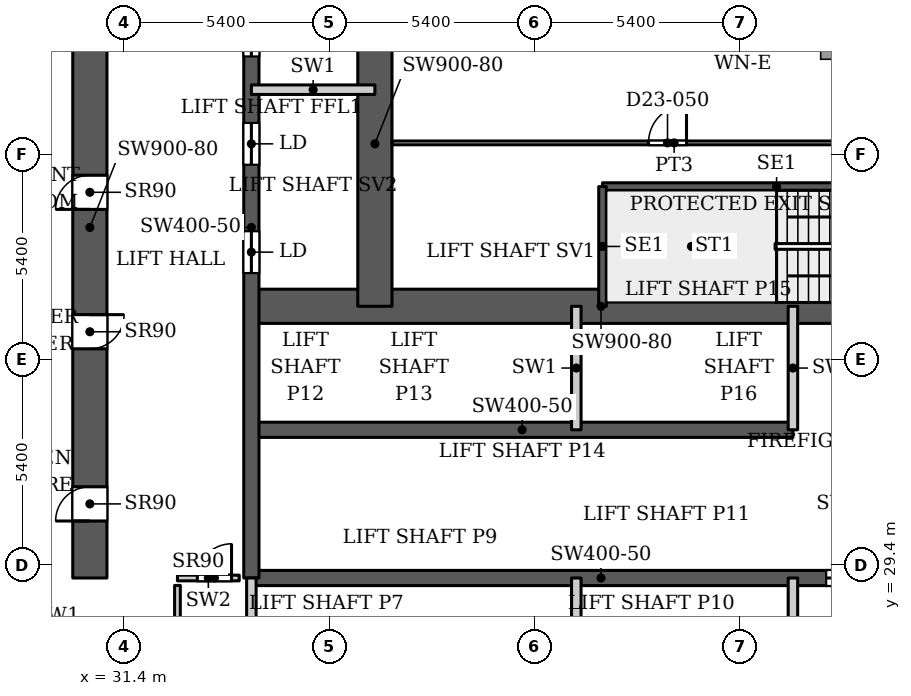
"""IFC4 building model, lengths in metres.
Left out: names, types, materials, properties, quantities, classifications, styles, units other than length and angle.
Written with IfcOpenShell. Run it as: python <this file> out.ifc"""

import sys

from ifc_helpers import new_model, si_unit, direction, frame, frame_2d, origin, place, context, subcontext, project, spatial, rectangle, extrude, source, transform, mapped, element, fill, save


model = new_model("IFC4")
c1 = context("Model", 3, precision=1e-05, world=origin(), true_north=direction((0.0, 1.0)))
c2 = subcontext(c1, "Body", "Model", "MODEL_VIEW")
j1 = project(units=[si_unit("LENGTHUNIT", "METRE"), si_unit("PLANEANGLEUNIT", "RADIAN")], contexts=[c1])
p1 = place(None, origin())
s1 = spatial("IfcSite", under=j1, at=p1, CompositionType="ELEMENT")
p2 = place(p1, origin())
s2 = spatial("IfcBuilding", under=s1, at=p2, CompositionType="ELEMENT")
p3 = place(p2, frame((0.0, 0.0, 101.9)))
s3 = spatial("IfcBuildingStorey", under=s2, at=p3, CompositionType="ELEMENT", Elevation=101.9)
p4 = place(p3, frame((34.75, 29.05, 0.0), z_axis=(0.0, 0.0, 1.0), x_axis=(1.0, 0.0, 0.0)))
e1 = element("IfcWall", 1, at=p4, inside=s3, PredefinedType="SHEAR", context=c2, shape_type="SweptSolid", body=[
    extrude(rectangle(XDim=18.4, YDim=0.4, at=frame_2d((9.2, 0.0))), origin(), (0.0, 0.0, 1.0), 3.9),
])
p5 = place(p4, frame((15.125, 0.0, 0.0)))
e2 = element("IfcOpeningElement", 2, at=p5, cuts=e1, PredefinedType="OPENING", context=c2, shape_type="SweptSolid", body=[
    extrude(rectangle(XDim=1.1, YDim=2.2, at=frame_2d((0.55, 1.1))), frame((0.0, 0.21, 0.0), z_axis=(0.0, -1.0, 0.0), x_axis=(1.0, 0.0, 0.0)), (0.0, 0.0, 1.0), 0.42),
])
p6 = place(p3, frame((34.75, 32.95, 0.0), z_axis=(0.0, 0.0, 1.0), x_axis=(1.0, 0.0, 0.0)))
e3 = element("IfcWall", 3, at=p6, inside=s3, PredefinedType="SHEAR", context=c2, shape_type="SweptSolid", body=[
    extrude(rectangle(XDim=14.25, YDim=0.4, at=frame_2d((7.125, 0.0))), origin(), (0.0, 0.0, 1.0), 3.9),
])
p7 = place(p3, frame((34.75, 36.2, 0.0), z_axis=(0.0, 0.0, 1.0), x_axis=(1.0, 0.0, 0.0)))
e4 = element("IfcWall", 4, at=p7, inside=s3, PredefinedType="SHEAR", context=c2, shape_type="SweptSolid", body=[
    extrude(rectangle(XDim=18.4, YDim=0.9, at=frame_2d((9.2, 0.0))), origin(), (0.0, 0.0, 1.0), 3.9),
])
p8 = place(p7, frame((16.9, 0.0, 0.0)))
e5 = element("IfcOpeningElement", 5, at=p8, cuts=e4, PredefinedType="OPENING", context=c2, shape_type="SweptSolid", body=[
    extrude(rectangle(XDim=1.0, YDim=2.2, at=frame_2d((0.5, 1.1))), frame((0.0, 0.46, 0.0), z_axis=(0.0, -1.0, 0.0), x_axis=(1.0, 0.0, 0.0)), (0.0, 0.0, 1.0), 0.92),
])
p9 = place(p3, frame((34.75, 29.05, 0.0), z_axis=(0.0, 0.0, 1.0), x_axis=(0.0, 1.0, 0.0)))
e6 = element("IfcWall", 6, at=p9, inside=s3, PredefinedType="SHEAR", context=c2, shape_type="SweptSolid", body=[
    extrude(rectangle(XDim=18.45, YDim=0.4, at=frame_2d((9.225, 0.0))), origin(), (0.0, 0.0, 1.0), 3.9),
])
p10 = place(p9, frame((8.025, 0.0, 0.0)))
e7 = element("IfcOpeningElement", 7, at=p10, cuts=e6, PredefinedType="OPENING", context=c2, shape_type="SweptSolid", body=[
    extrude(rectangle(XDim=1.1, YDim=2.2, at=frame_2d((0.55, 1.1))), frame((0.0, 0.21, 0.0), z_axis=(0.0, -1.0, 0.0), x_axis=(1.0, 0.0, 0.0)), (0.0, 0.0, 1.0), 0.42),
])
p11 = place(p9, frame((10.875, 0.0, 0.0)))
e8 = element("IfcOpeningElement", 8, at=p11, cuts=e6, PredefinedType="OPENING", context=c2, shape_type="SweptSolid", body=[
    extrude(rectangle(XDim=1.1, YDim=2.2, at=frame_2d((0.55, 1.1))), frame((0.0, 0.21, 0.0), z_axis=(0.0, -1.0, 0.0), x_axis=(1.0, 0.0, 0.0)), (0.0, 0.0, 1.0), 0.42),
])
p12 = place(p9, frame((13.725, 0.0, 0.0)))
e9 = element("IfcOpeningElement", 9, at=p12, cuts=e6, PredefinedType="OPENING", context=c2, shape_type="SweptSolid", body=[
    extrude(rectangle(XDim=1.1, YDim=2.2, at=frame_2d((0.55, 1.1))), frame((0.0, 0.21, 0.0), z_axis=(0.0, -1.0, 0.0), x_axis=(1.0, 0.0, 0.0)), (0.0, 0.0, 1.0), 0.42),
])
p13 = place(p9, frame((15.95, 0.0, 0.0)))
e10 = element("IfcOpeningElement", 10, at=p13, cuts=e6, PredefinedType="OPENING", context=c2, shape_type="SweptSolid", body=[
    extrude(rectangle(XDim=1.1, YDim=2.2, at=frame_2d((0.55, 1.1))), frame((0.0, 0.21, 0.0), z_axis=(0.0, -1.0, 0.0), x_axis=(1.0, 0.0, 0.0)), (0.0, 0.0, 1.0), 0.42),
])
p14 = place(p3, frame((38.0, 36.2, 0.0), z_axis=(0.0, 0.0, 1.0), x_axis=(0.0, 1.0, 0.0)))
e11 = element("IfcWall", 11, at=p14, inside=s3, PredefinedType="SHEAR", context=c2, shape_type="SweptSolid", body=[
    extrude(rectangle(XDim=8.55, YDim=0.9, at=frame_2d((4.275, 0.0))), origin(), (0.0, 0.0, 1.0), 3.9),
])
p15 = place(p3, frame((30.5, 29.05, 0.0), z_axis=(0.0, 0.0, 1.0), x_axis=(0.0, 1.0, 0.0)))
e12 = element("IfcWall", 12, at=p15, inside=s3, PredefinedType="SHEAR", context=c2, shape_type="SweptSolid", body=[
    extrude(rectangle(XDim=18.45, YDim=0.9, at=frame_2d((9.225, 0.0))), origin(), (0.0, 0.0, 1.0), 3.9),
])
p16 = place(p15, frame((1.5, 0.0, 0.0)))
e13 = element("IfcOpeningElement", 13, at=p16, cuts=e12, PredefinedType="OPENING", context=c2, shape_type="SweptSolid", body=[
    extrude(rectangle(XDim=0.9, YDim=2.2, at=frame_2d((0.45, 1.1))), frame((0.0, 0.46, 0.0), z_axis=(0.0, -1.0, 0.0), x_axis=(1.0, 0.0, 0.0)), (0.0, 0.0, 1.0), 0.92),
])
p17 = place(p15, frame((6.03, 0.0, 0.0)))
e14 = element("IfcOpeningElement", 14, at=p17, cuts=e12, PredefinedType="OPENING", context=c2, shape_type="SweptSolid", body=[
    extrude(rectangle(XDim=0.9, YDim=2.2, at=frame_2d((0.45, 1.1))), frame((0.0, 0.46, 0.0), z_axis=(0.0, -1.0, 0.0), x_axis=(1.0, 0.0, 0.0)), (0.0, 0.0, 1.0), 0.92),
])
p18 = place(p15, frame((9.7, 0.0, 0.0)))
e15 = element("IfcOpeningElement", 15, at=p18, cuts=e12, PredefinedType="OPENING", context=c2, shape_type="SweptSolid", body=[
    extrude(rectangle(XDim=0.9, YDim=2.2, at=frame_2d((0.45, 1.1))), frame((0.0, 0.46, 0.0), z_axis=(0.0, -1.0, 0.0), x_axis=(1.0, 0.0, 0.0)), (0.0, 0.0, 1.0), 0.92),
])
p19 = place(p3, frame((29.712, 26.072, 0.0), z_axis=(0.0, 0.0, 1.0), x_axis=(-0.511028049012, 0.859564036662, 0.0)))
e16 = element("IfcWall", 16, at=p19, inside=s3, PredefinedType="SOLIDWALL", context=c2, shape_type="SweptSolid", body=[
    extrude(rectangle(XDim=4.634, YDim=0.25, at=frame_2d((2.317, 0.0))), origin(), (0.0, 0.0, 1.0), 3.147),
])
p20 = place(p3, frame((27.195, 31.969, 0.0), z_axis=(0.0, 0.0, 1.0), x_axis=(0.052559748861, 0.998617781135, 0.0)))
e17 = element("IfcWall", 17, at=p20, inside=s3, PredefinedType="SOLIDWALL", context=c2, shape_type="SweptSolid", body=[
    extrude(rectangle(XDim=55.972, YDim=0.25, at=frame_2d((27.986, 0.0))), origin(), (0.0, 0.0, 1.0), 3.75),
])
p21 = place(p3, frame((43.99, 39.35, 0.0), z_axis=(0.0, 0.0, 1.0), x_axis=(1.0, 0.0, 0.0)))
e18 = element("IfcWall", 18, at=p21, inside=s3, PredefinedType="SHEAR", context=c2, shape_type="SweptSolid", body=[
    extrude(rectangle(XDim=9.16, YDim=0.2, at=frame_2d((4.58, 0.0))), origin(), (0.0, 0.0, 1.0), 3.9),
])
p22 = place(p3, frame((43.99, 36.2, 0.0), z_axis=(0.0, 0.0, 1.0), x_axis=(0.0, 1.0, 0.0)))
e19 = element("IfcWall", 19, at=p22, inside=s3, PredefinedType="SHEAR", context=c2, shape_type="SweptSolid", body=[
    extrude(rectangle(XDim=3.15, YDim=0.2, at=frame_2d((1.575, 0.0))), origin(), (0.0, 0.0, 1.0), 3.9),
])
for number, where, z_axis, x_axis in (
    (20, (34.75, 25.8, 0.0), (0.0, 0.0, 1.0), (0.0, 1.0, 0.0)),
    (21, (43.3, 25.8, 0.0), (0.0, 0.0, 1.0), (0.0, 1.0, 0.0)),
    (22, (43.3, 32.95, 0.0), (0.0, 0.0, 1.0), (0.0, 1.0, 0.0)),
    (23, (49.0, 25.8, 0.0), (0.0, 0.0, 1.0), (0.0, 1.0, 0.0)),
    (24, (49.0, 32.95, 0.0), (0.0, 0.0, 1.0), (0.0, 1.0, 0.0)),
    (25, (34.75, 41.9, 0.0), (0.0, 0.0, 1.0), (1.0, 0.0, 0.0)),
):
    element("IfcWall", number, at=place(p3, frame(where, z_axis=z_axis, x_axis=x_axis)), inside=s3, PredefinedType="PARTITIONING", context=c2, shape_type="SweptSolid", body=[
        extrude(rectangle(XDim=3.25, YDim=0.25, at=frame_2d((1.625, 0.0))), origin(), (0.0, 0.0, 1.0), 3.9),
    ])
p23 = place(p3, frame((32.805, 29.05, 0.0), z_axis=(0.0, 0.0, 1.0), x_axis=(1.0, 0.0, 0.0)))
e26 = element("IfcWall", 26, at=p23, inside=s3, PredefinedType="PARTITIONING", context=c2, shape_type="SweptSolid", body=[
    extrude(rectangle(XDim=1.625, YDim=0.15, at=frame_2d((0.812, 0.0))), origin(), (0.0, 0.0, 1.0), 3.9),
])
p24 = place(p23, frame((0.523, 0.0, 0.0)))
e27 = element("IfcOpeningElement", 27, at=p24, cuts=e26, PredefinedType="OPENING", context=c2, shape_type="SweptSolid", body=[
    extrude(rectangle(XDim=0.9, YDim=2.2, at=frame_2d((0.45, 1.1))), frame((0.0, 0.085, 0.0), z_axis=(0.0, -1.0, 0.0), x_axis=(1.0, 0.0, 0.0)), (0.0, 0.0, 1.0), 0.17),
])
p25 = place(p3, frame((32.805, 24.98, 0.0), z_axis=(0.0, 0.0, 1.0), x_axis=(0.0, 1.0, 0.0)))
e28 = element("IfcWall", 28, at=p25, inside=s3, PredefinedType="PARTITIONING", context=c2, shape_type="SweptSolid", body=[
    extrude(rectangle(XDim=3.875, YDim=0.15, at=frame_2d((1.938, 0.0))), origin(), (0.0, 0.0, 1.0), 3.9),
])
p26 = place(p3, frame((38.449, 40.5, 0.0), z_axis=(0.0, 0.0, 1.0), x_axis=(1.0, 0.0, 0.0)))
e29 = element("IfcWall", 29, at=p26, inside=s3, PredefinedType="PARTITIONING", context=c2, shape_type="SweptSolid", body=[
    extrude(rectangle(XDim=14.851, YDim=0.1, at=frame_2d((7.426, 0.0))), origin(), (0.0, 0.0, 1.0), 3.6),
])
p27 = place(p26, frame((6.751, 0.0, 0.0)))
e30 = element("IfcOpeningElement", 30, at=p27, cuts=e29, PredefinedType="OPENING", context=c2, shape_type="SweptSolid", body=[
    extrude(rectangle(XDim=1.0, YDim=2.1, at=frame_2d((0.5, 1.05))), frame((0.0, 0.06, 0.0), z_axis=(0.0, -1.0, 0.0), x_axis=(1.0, 0.0, 0.0)), (0.0, 0.0, 1.0), 0.12),
])
m1 = source(origin(), c2, "Body", "SweptSolid", [
    extrude(rectangle(XDim=1.1, YDim=2.2, at=frame_2d((0.55, 1.1))), frame((0.0, 0.025, 0.0), z_axis=(0.0, -1.0, 0.0), x_axis=(1.0, 0.0, 0.0)), (0.0, 0.0, 1.0), 0.05),
])
p28 = place(p10, origin())
e31 = element("IfcDoor", 31, at=p28, inside=s3, OperationType="SLIDING_TO_LEFT", PredefinedType="DOOR", context=c2, shape_type="MappedRepresentation", body=[
    mapped(m1, transform((0.0, 0.0, 0.0), x_axis=(1.0, 0.0, 0.0), y_axis=(0.0, 1.0, 0.0), z_axis=(0.0, 0.0, 1.0), scale=1.0)),
])
fill(e7, e31)
p29 = place(p11, origin())
e32 = element("IfcDoor", 32, at=p29, inside=s3, OperationType="SLIDING_TO_LEFT", PredefinedType="DOOR", context=c2, shape_type="MappedRepresentation", body=[
    mapped(m1, transform((0.0, 0.0, 0.0), x_axis=(1.0, 0.0, 0.0), y_axis=(0.0, 1.0, 0.0), z_axis=(0.0, 0.0, 1.0), scale=1.0)),
])
fill(e8, e32)
p30 = place(p12, origin())
e33 = element("IfcDoor", 33, at=p30, inside=s3, OperationType="SLIDING_TO_LEFT", PredefinedType="DOOR", context=c2, shape_type="MappedRepresentation", body=[
    mapped(m1, transform((0.0, 0.0, 0.0), x_axis=(1.0, 0.0, 0.0), y_axis=(0.0, 1.0, 0.0), z_axis=(0.0, 0.0, 1.0), scale=1.0)),
])
fill(e9, e33)
p31 = place(p5, origin())
e34 = element("IfcDoor", 34, at=p31, inside=s3, OperationType="SLIDING_TO_LEFT", PredefinedType="DOOR", context=c2, shape_type="MappedRepresentation", body=[
    mapped(m1, transform((0.0, 0.0, 0.0), x_axis=(1.0, 0.0, 0.0), y_axis=(0.0, 1.0, 0.0), z_axis=(0.0, 0.0, 1.0), scale=1.0)),
])
fill(e2, e34)
m2 = source(origin(), c2, "Body", "SweptSolid", [
    extrude(rectangle(XDim=0.9, YDim=2.2, at=frame_2d((0.45, 1.1))), frame((0.0, 0.025, 0.0), z_axis=(0.0, -1.0, 0.0), x_axis=(1.0, 0.0, 0.0)), (0.0, 0.0, 1.0), 0.05),
])
p32 = place(p16, origin())
e35 = element("IfcDoor", 35, at=p32, inside=s3, OperationType="SINGLE_SWING_LEFT", PredefinedType="DOOR", context=c2, shape_type="MappedRepresentation", body=[
    mapped(m2, transform((0.0, 0.0, 0.0), x_axis=(1.0, 0.0, 0.0), y_axis=(0.0, 1.0, 0.0), z_axis=(0.0, 0.0, 1.0), scale=1.0)),
])
fill(e13, e35)
p33 = place(p17, origin())
e36 = element("IfcDoor", 36, at=p33, inside=s3, OperationType="SINGLE_SWING_RIGHT", PredefinedType="DOOR", context=c2, shape_type="MappedRepresentation", body=[
    mapped(m2, transform((0.0, 0.0, 0.0), x_axis=(1.0, 0.0, 0.0), y_axis=(0.0, 1.0, 0.0), z_axis=(0.0, 0.0, 1.0), scale=1.0)),
])
fill(e14, e36)
p34 = place(p18, origin())
e37 = element("IfcDoor", 37, at=p34, inside=s3, OperationType="SINGLE_SWING_LEFT", PredefinedType="DOOR", context=c2, shape_type="MappedRepresentation", body=[
    mapped(m2, transform((0.0, 0.0, 0.0), x_axis=(1.0, 0.0, 0.0), y_axis=(0.0, 1.0, 0.0), z_axis=(0.0, 0.0, 1.0), scale=1.0)),
])
fill(e15, e37)
p35 = place(p24, origin())
e38 = element("IfcDoor", 38, at=p35, inside=s3, OperationType="SINGLE_SWING_LEFT", PredefinedType="DOOR", context=c2, shape_type="MappedRepresentation", body=[
    mapped(m2, transform((0.0, 0.0, 0.0), x_axis=(1.0, 0.0, 0.0), y_axis=(0.0, 1.0, 0.0), z_axis=(0.0, 0.0, 1.0), scale=1.0)),
])
fill(e27, e38)
m3 = source(origin(), c2, "Body", "SweptSolid", [
    extrude(rectangle(XDim=1.0, YDim=2.1, at=frame_2d((0.5, 1.05))), frame((0.0, 0.025, 0.0), z_axis=(0.0, -1.0, 0.0), x_axis=(1.0, 0.0, 0.0)), (0.0, 0.0, 1.0), 0.05),
])
p36 = place(p27, origin())
e39 = element("IfcDoor", 39, at=p36, inside=s3, OperationType="SINGLE_SWING_LEFT", PredefinedType="DOOR", context=c2, shape_type="MappedRepresentation", body=[
    mapped(m3, transform((0.0, 0.0, 0.0), x_axis=(1.0, 0.0, 0.0), y_axis=(0.0, 1.0, 0.0), z_axis=(0.0, 0.0, 1.0), scale=1.0)),
])
fill(e30, e39)
save(model, sys.argv[1])
